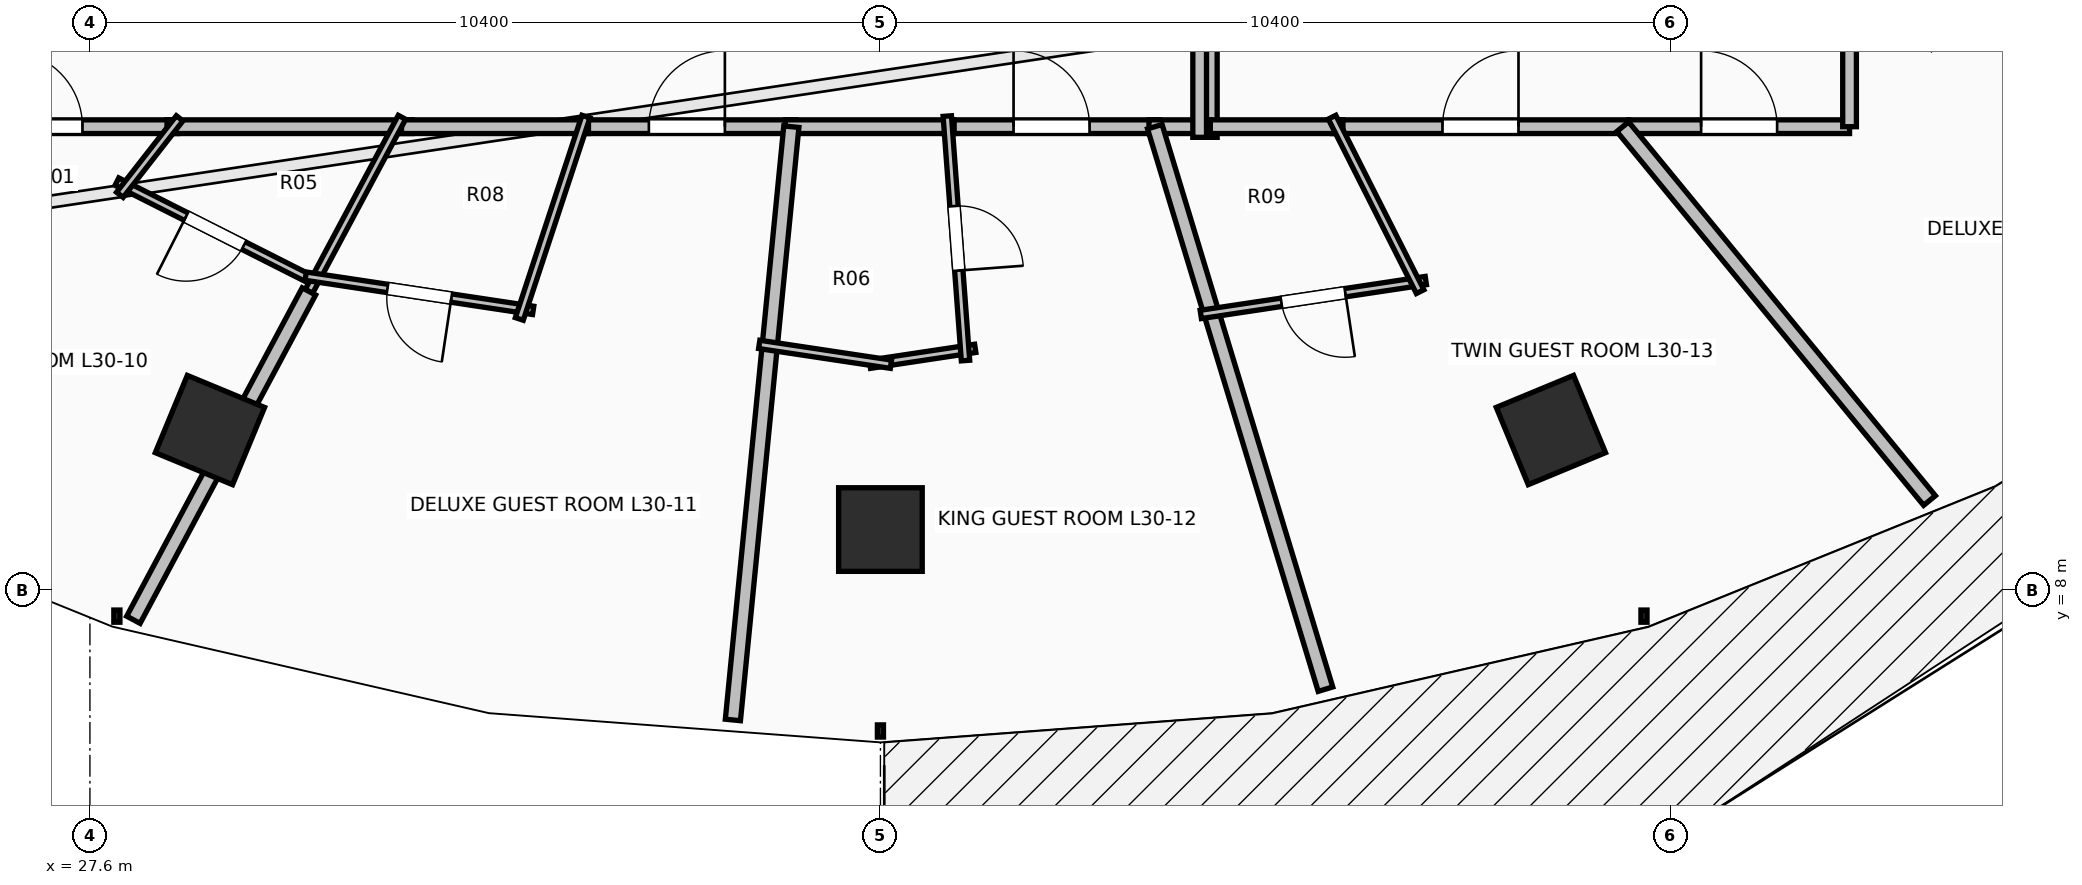
"""IFC4 building model, lengths in metres.
Left out: names, types, materials, properties, quantities, classifications, styles, units other than length and angle.
Written with IfcOpenShell. Run it as: python <this file> out.ifc"""

import sys

from ifc_helpers import new_model, si_unit, direction, frame, frame_2d, origin, origin_2d, place, context, subcontext, project, spatial, rectangle, extrude, element, fill, save


model = new_model("IFC4")
c1 = context("Model", 3, precision=1e-05, world=origin(), true_north=direction((0.0, 1.0)))
c2 = subcontext(c1, "Body", "Model", "MODEL_VIEW")
j1 = project(units=[si_unit("LENGTHUNIT", "METRE"), si_unit("PLANEANGLEUNIT", "RADIAN")], contexts=[c1])
p1 = place(None, origin())
s1 = spatial("IfcSite", under=j1, at=p1, CompositionType="ELEMENT")
p2 = place(p1, origin())
s2 = spatial("IfcBuilding", under=s1, at=p2, CompositionType="ELEMENT")
p3 = place(p2, frame((0.0, 0.0, 113.8)))
s3 = spatial("IfcBuildingStorey", under=s2, at=p3, CompositionType="ELEMENT", Elevation=113.8)
for number, where, z_axis, x_axis in (
    (1, (29.179, 10.109, 0.0), (0.0, 0.0, 1.0), (-0.383, -0.924, 0.0)),
    (2, (38.0, 8.8, 0.0), (0.0, 0.0, 1.0), (0.0, -1.0, 0.0)),
    (3, (46.821, 10.109, 0.0), (0.0, 0.0, 1.0), (0.383, -0.924, 0.0)),
):
    element("IfcColumn", number, at=place(p3, frame(where, z_axis=z_axis, x_axis=x_axis)), inside=s3, PredefinedType="COLUMN", context=c2, shape_type="SweptSolid", body=[
        extrude(rectangle(XDim=1.1, YDim=1.1, at=origin_2d()), origin(), (0.0, 0.0, 1.0), 3.5),
    ])
p4 = place(p3, frame((25.25, 14.1, 0.0), z_axis=(0.0, 0.0, 1.0), x_axis=(1.0, 0.0, 0.0)))
e4 = element("IfcWall", 4, at=p4, inside=s3, PredefinedType="PARTITIONING", context=c2, shape_type="SweptSolid", body=[
    extrude(rectangle(XDim=3.504, YDim=0.18, at=frame_2d((1.752, 0.0))), origin(), (0.0, 0.0, 1.0), 2.432),
])
p5 = place(p4, frame((1.252, 0.0, 0.0)))
e5 = element("IfcOpeningElement", 5, at=p5, cuts=e4, PredefinedType="OPENING", context=c2, shape_type="SweptSolid", body=[
    extrude(rectangle(XDim=1.0, YDim=2.15, at=frame_2d((0.5, 1.075))), frame((0.0, 0.105, 0.0), z_axis=(0.0, -1.0, 0.0), x_axis=(1.0, 0.0, 0.0)), (0.0, 0.0, 1.0), 0.21),
])
p6 = place(p3, frame((28.614, 14.1, 0.0), z_axis=(0.0, 0.0, 1.0), x_axis=(1.0, 0.0, 0.0)))
e6 = element("IfcWall", 6, at=p6, inside=s3, PredefinedType="PARTITIONING", context=c2, shape_type="SweptSolid", body=[
    extrude(rectangle(XDim=3.225, YDim=0.18, at=frame_2d((1.613, 0.0))), origin(), (0.0, 0.0, 1.0), 2.929),
])
p7 = place(p3, frame((34.019, 14.1, 0.0), z_axis=(0.0, 0.0, 1.0), x_axis=(1.0, 0.0, 0.0)))
e7 = element("IfcWall", 7, at=p7, inside=s3, PredefinedType="PARTITIONING", context=c2, shape_type="SweptSolid", body=[
    extrude(rectangle(XDim=2.869, YDim=0.18, at=frame_2d((1.435, 0.0))), origin(), (0.0, 0.0, 1.0), 2.929),
])
p8 = place(p7, frame((0.935, 0.0, 0.0)))
e8 = element("IfcOpeningElement", 8, at=p8, cuts=e7, PredefinedType="OPENING", context=c2, shape_type="SweptSolid", body=[
    extrude(rectangle(XDim=1.0, YDim=2.15, at=frame_2d((0.5, 1.075))), frame((0.0, 0.105, 0.0), z_axis=(0.0, -1.0, 0.0), x_axis=(1.0, 0.0, 0.0)), (0.0, 0.0, 1.0), 0.21),
])
p9 = place(p3, frame((31.699, 14.1, 0.0), z_axis=(0.0, 0.0, 1.0), x_axis=(1.0, 0.0, 0.0)))
e9 = element("IfcWall", 9, at=p9, inside=s3, PredefinedType="PARTITIONING", context=c2, shape_type="SweptSolid", body=[
    extrude(rectangle(XDim=2.46, YDim=0.18, at=frame_2d((1.23, 0.0))), origin(), (0.0, 0.0, 1.0), 2.929),
])
p10 = place(p3, frame((38.83, 14.1, 0.0), z_axis=(0.0, 0.0, 1.0), x_axis=(1.0, 0.0, 0.0)))
e10 = element("IfcWall", 10, at=p10, inside=s3, PredefinedType="PARTITIONING", context=c2, shape_type="SweptSolid", body=[
    extrude(rectangle(XDim=2.843, YDim=0.18, at=frame_2d((1.421, 0.0))), origin(), (0.0, 0.0, 1.0), 2.929),
])
p11 = place(p10, frame((0.921, 0.0, 0.0)))
e11 = element("IfcOpeningElement", 11, at=p11, cuts=e10, PredefinedType="OPENING", context=c2, shape_type="SweptSolid", body=[
    extrude(rectangle(XDim=1.0, YDim=2.15, at=frame_2d((0.5, 1.075))), frame((0.0, 0.105, 0.0), z_axis=(0.0, -1.0, 0.0), x_axis=(1.0, 0.0, 0.0)), (0.0, 0.0, 1.0), 0.21),
])
p12 = place(p3, frame((36.748, 14.1, 0.0), z_axis=(0.0, 0.0, 1.0), x_axis=(1.0, 0.0, 0.0)))
e12 = element("IfcWall", 12, at=p12, inside=s3, PredefinedType="PARTITIONING", context=c2, shape_type="SweptSolid", body=[
    extrude(rectangle(XDim=2.222, YDim=0.18, at=frame_2d((1.111, 0.0))), origin(), (0.0, 0.0, 1.0), 2.929),
])
p13 = place(p3, frame((43.945, 14.1, 0.0), z_axis=(0.0, 0.0, 1.0), x_axis=(1.0, 0.0, 0.0)))
e13 = element("IfcWall", 13, at=p13, inside=s3, PredefinedType="PARTITIONING", context=c2, shape_type="SweptSolid", body=[
    extrude(rectangle(XDim=3.899, YDim=0.18, at=frame_2d((1.949, 0.0))), origin(), (0.0, 0.0, 1.0), 2.432),
])
p14 = place(p13, frame((1.449, 0.0, 0.0)))
e14 = element("IfcOpeningElement", 14, at=p14, cuts=e13, PredefinedType="OPENING", context=c2, shape_type="SweptSolid", body=[
    extrude(rectangle(XDim=1.0, YDim=2.15, at=frame_2d((0.5, 1.075))), frame((0.0, 0.105, 0.0), z_axis=(0.0, -1.0, 0.0), x_axis=(1.0, 0.0, 0.0)), (0.0, 0.0, 1.0), 0.21),
])
p15 = place(p3, frame((42.34, 16.38, 0.0), z_axis=(0.0, 0.0, 1.0), x_axis=(0.0, -1.0, 0.0)))
e15 = element("IfcWall", 15, at=p15, inside=s3, PredefinedType="PARTITIONING", context=c2, shape_type="SweptSolid", body=[
    extrude(rectangle(XDim=2.42, YDim=0.18, at=frame_2d((1.21, 0.0))), origin(), (0.0, 0.0, 1.0), 2.929),
])
p16 = place(p3, frame((42.2, 14.1, 0.0), z_axis=(0.0, 0.0, 1.0), x_axis=(1.0, 0.0, 0.0)))
e16 = element("IfcWall", 16, at=p16, inside=s3, PredefinedType="PARTITIONING", context=c2, shape_type="SweptSolid", body=[
    extrude(rectangle(XDim=1.885, YDim=0.18, at=frame_2d((0.942, 0.0))), origin(), (0.0, 0.0, 1.0), 2.929),
])
p17 = place(p3, frame((41.533, 14.1, 0.0), z_axis=(0.0, 0.0, 1.0), x_axis=(1.0, 0.0, 0.0)))
e17 = element("IfcWall", 17, at=p17, inside=s3, PredefinedType="PARTITIONING", context=c2, shape_type="SweptSolid", body=[
    extrude(rectangle(XDim=0.807, YDim=0.18, at=frame_2d((0.404, 0.0))), origin(), (0.0, 0.0, 1.0), 2.929),
])
p18 = place(p3, frame((42.2, 13.96, 0.0), z_axis=(0.0, 0.0, 1.0), x_axis=(0.0, 1.0, 0.0)))
e18 = element("IfcWall", 18, at=p18, inside=s3, PredefinedType="PARTITIONING", context=c2, shape_type="SweptSolid", body=[
    extrude(rectangle(XDim=2.42, YDim=0.18, at=frame_2d((1.21, 0.0))), origin(), (0.0, 0.0, 1.0), 2.929),
])
p19 = place(p3, frame((47.844, 14.1, 0.0), z_axis=(0.0, 0.0, 1.0), x_axis=(1.0, 0.0, 0.0)))
e19 = element("IfcWall", 19, at=p19, inside=s3, PredefinedType="PARTITIONING", context=c2, shape_type="SweptSolid", body=[
    extrude(rectangle(XDim=2.906, YDim=0.18, at=frame_2d((1.453, 0.0))), origin(), (0.0, 0.0, 1.0), 2.432),
])
p20 = place(p19, frame((0.953, 0.0, 0.0)))
e20 = element("IfcOpeningElement", 20, at=p20, cuts=e19, PredefinedType="OPENING", context=c2, shape_type="SweptSolid", body=[
    extrude(rectangle(XDim=1.0, YDim=2.15, at=frame_2d((0.5, 1.075))), frame((0.0, 0.105, 0.0), z_axis=(0.0, -1.0, 0.0), x_axis=(1.0, 0.0, 0.0)), (0.0, 0.0, 1.0), 0.21),
])
p21 = place(p3, frame((50.75, 14.1, 0.0), z_axis=(0.0, 0.0, 1.0), x_axis=(0.0, 1.0, 0.0)))
e21 = element("IfcWall", 21, at=p21, inside=s3, PredefinedType="PARTITIONING", context=c2, shape_type="SweptSolid", body=[
    extrude(rectangle(XDim=1.99, YDim=0.18, at=frame_2d((0.995, 0.0))), origin(), (0.0, 0.0, 1.0), 2.432),
])
p22 = place(p3, frame((30.533, 12.075, 0.0), z_axis=(0.0, 0.0, 1.0), x_axis=(-0.89257679281, 0.450895407979, 0.0)))
e22 = element("IfcWall", 22, at=p22, inside=s3, PredefinedType="PARTITIONING", context=c2, shape_type="SweptSolid", body=[
    extrude(rectangle(XDim=2.888, YDim=0.11, at=frame_2d((1.444, 0.0))), origin(), (0.0, 0.0, 1.0), 2.432),
])
p23 = place(p22, frame((1.019, 0.0, 0.0)))
e23 = element("IfcOpeningElement", 23, at=p23, cuts=e22, PredefinedType="OPENING", context=c2, shape_type="SweptSolid", body=[
    extrude(rectangle(XDim=0.85, YDim=2.1, at=frame_2d((0.425, 1.05))), frame((0.0, 0.07, 0.0), z_axis=(0.0, -1.0, 0.0), x_axis=(1.0, 0.0, 0.0)), (0.0, 0.0, 1.0), 0.14),
])
p24 = place(p3, frame((27.994, 13.204, 0.0), z_axis=(0.0, 0.0, 1.0), x_axis=(0.615632914819, 0.788033066687, 0.0)))
e24 = element("IfcWall", 24, at=p24, inside=s3, PredefinedType="PARTITIONING", context=c2, shape_type="SweptSolid", body=[
    extrude(rectangle(XDim=1.277, YDim=0.11, at=frame_2d((0.639, 0.0))), origin(), (0.0, 0.0, 1.0), 2.432),
])
p25 = place(p3, frame((30.481, 11.934, 0.0), z_axis=(0.0, 0.0, 1.0), x_axis=(0.471456709401, 0.881889205718, 0.0)))
e25 = element("IfcWall", 25, at=p25, inside=s3, PredefinedType="PARTITIONING", context=c2, shape_type="SweptSolid", body=[
    extrude(rectangle(XDim=2.596, YDim=0.11, at=frame_2d((1.298, 0.0))), origin(), (0.0, 0.0, 1.0), 2.886),
])
p26 = place(p3, frame((28.172, 7.613, 0.0), z_axis=(0.0, 0.0, 1.0), x_axis=(0.47136925097, 0.881935955294, 0.0)))
e26 = element("IfcWall", 26, at=p26, inside=s3, PredefinedType="PARTITIONING", context=c2, shape_type="SweptSolid", body=[
    extrude(rectangle(XDim=4.899, YDim=0.2, at=frame_2d((2.449, 0.0))), origin(), (0.0, 0.0, 1.0), 2.677),
])
p27 = place(p3, frame((33.431, 11.683, 0.0), z_axis=(0.0, 0.0, 1.0), x_axis=(-0.988849795555, 0.148916358508, 0.0)))
e27 = element("IfcWall", 27, at=p27, inside=s3, PredefinedType="PARTITIONING", context=c2, shape_type="SweptSolid", body=[
    extrude(rectangle(XDim=3.026, YDim=0.11, at=frame_2d((1.513, 0.0))), origin(), (0.0, 0.0, 1.0), 2.886),
])
p28 = place(p27, frame((1.088, 0.0, 0.0)))
e28 = element("IfcOpeningElement", 28, at=p28, cuts=e27, PredefinedType="OPENING", context=c2, shape_type="SweptSolid", body=[
    extrude(rectangle(XDim=0.85, YDim=2.1, at=frame_2d((0.425, 1.05))), frame((0.0, 0.07, 0.0), z_axis=(0.0, -1.0, 0.0), x_axis=(1.0, 0.0, 0.0)), (0.0, 0.0, 1.0), 0.14),
])
p29 = place(p3, frame((34.126, 14.233, 0.0), z_axis=(0.0, 0.0, 1.0), x_axis=(-0.312749678962, -0.949835584882, 0.0)))
e29 = element("IfcWall", 29, at=p29, inside=s3, PredefinedType="PARTITIONING", context=c2, shape_type="SweptSolid", body=[
    extrude(rectangle(XDim=2.802, YDim=0.11, at=frame_2d((1.401, 0.0))), origin(), (0.0, 0.0, 1.0), 2.886),
])
p30 = place(p3, frame((36.059, 6.295, 0.0), z_axis=(0.0, 0.0, 1.0), x_axis=(0.098024226043, 0.995184028765, 0.0)))
e30 = element("IfcWall", 30, at=p30, inside=s3, PredefinedType="PARTITIONING", context=c2, shape_type="SweptSolid", body=[
    extrude(rectangle(XDim=7.843, YDim=0.2, at=frame_2d((3.921, 0.0))), origin(), (0.0, 0.0, 1.0), 2.677),
])
p31 = place(p3, frame((39.247, 11.184, 0.0), z_axis=(0.0, 0.0, 1.0), x_axis=(-0.988844156702, -0.148953797389, 0.0)))
e31 = element("IfcWall", 31, at=p31, inside=s3, PredefinedType="PARTITIONING", context=c2, shape_type="SweptSolid", body=[
    extrude(rectangle(XDim=1.401, YDim=0.11, at=frame_2d((0.701, 0.0))), origin(), (0.0, 0.0, 1.0), 3.24),
])
p32 = place(p3, frame((38.138, 10.975, 0.0), z_axis=(0.0, 0.0, 1.0), x_axis=(-0.988868806461, 0.148790065554, 0.0)))
e32 = element("IfcWall", 32, at=p32, inside=s3, PredefinedType="PARTITIONING", context=c2, shape_type="SweptSolid", body=[
    extrude(rectangle(XDim=1.752, YDim=0.11, at=frame_2d((0.876, 0.0))), origin(), (0.0, 0.0, 1.0), 3.24),
])
p33 = place(p3, frame((38.88, 14.24, 0.0), z_axis=(0.0, 0.0, 1.0), x_axis=(0.074340146514, -0.997232943006, 0.0)))
e33 = element("IfcWall", 33, at=p33, inside=s3, PredefinedType="PARTITIONING", context=c2, shape_type="SweptSolid", body=[
    extrude(rectangle(XDim=3.225, YDim=0.11, at=frame_2d((1.613, 0.0))), origin(), (0.0, 0.0, 1.0), 2.886),
])
p34 = place(p33, frame((1.188, 0.0, 0.0)))
e34 = element("IfcOpeningElement", 34, at=p34, cuts=e33, PredefinedType="OPENING", context=c2, shape_type="SweptSolid", body=[
    extrude(rectangle(XDim=0.85, YDim=2.1, at=frame_2d((0.425, 1.05))), frame((0.0, 0.07, 0.0), z_axis=(0.0, -1.0, 0.0), x_axis=(1.0, 0.0, 0.0)), (0.0, 0.0, 1.0), 0.14),
])
p35 = place(p3, frame((43.855, 6.7, 0.0), z_axis=(0.0, 0.0, 1.0), x_axis=(-0.290292155577, 0.956938067176, 0.0)))
e35 = element("IfcWall", 35, at=p35, inside=s3, PredefinedType="PARTITIONING", context=c2, shape_type="SweptSolid", body=[
    extrude(rectangle(XDim=7.733, YDim=0.2, at=frame_2d((3.867, 0.0))), origin(), (0.0, 0.0, 1.0), 2.432),
])
p36 = place(p3, frame((45.175, 12.076, 0.0), z_axis=(0.0, 0.0, 1.0), x_axis=(-0.988865063855, -0.148814937044, 0.0)))
e36 = element("IfcWall", 36, at=p36, inside=s3, PredefinedType="PARTITIONING", context=c2, shape_type="SweptSolid", body=[
    extrude(rectangle(XDim=2.994, YDim=0.11, at=frame_2d((1.497, 0.0))), origin(), (0.0, 0.0, 1.0), 2.432),
])
p37 = place(p36, frame((1.072, 0.0, 0.0)))
e37 = element("IfcOpeningElement", 37, at=p37, cuts=e36, PredefinedType="OPENING", context=c2, shape_type="SweptSolid", body=[
    extrude(rectangle(XDim=0.85, YDim=2.1, at=frame_2d((0.425, 1.05))), frame((0.0, 0.07, 0.0), z_axis=(0.0, -1.0, 0.0), x_axis=(1.0, 0.0, 0.0)), (0.0, 0.0, 1.0), 0.14),
])
p38 = place(p3, frame((43.942, 14.225, 0.0), z_axis=(0.0, 0.0, 1.0), x_axis=(0.450515334881, -0.892768689548, 0.0)))
e38 = element("IfcWall", 38, at=p38, inside=s3, PredefinedType="PARTITIONING", context=c2, shape_type="SweptSolid", body=[
    extrude(rectangle(XDim=2.571, YDim=0.11, at=frame_2d((1.285, 0.0))), origin(), (0.0, 0.0, 1.0), 2.432),
])
p39 = place(p3, frame((51.802, 9.182, 0.0), z_axis=(0.0, 0.0, 1.0), x_axis=(-0.634357186002, 0.773040076948, 0.0)))
e39 = element("IfcWall", 39, at=p39, inside=s3, PredefinedType="PARTITIONING", context=c2, shape_type="SweptSolid", body=[
    extrude(rectangle(XDim=6.362, YDim=0.2, at=frame_2d((3.181, 0.0))), origin(), (0.0, 0.0, 1.0), 2.432),
])
p40 = place(p5, origin())
e40 = element("IfcDoor", 40, at=p40, inside=s3, OperationType="SINGLE_SWING_LEFT", PredefinedType="DOOR", context=c2, shape_type="SweptSolid", body=[
    extrude(rectangle(XDim=1.0, YDim=2.15, at=frame_2d((0.5, 1.075))), frame((0.0, 0.025, 0.0), z_axis=(0.0, -1.0, 0.0), x_axis=(1.0, 0.0, 0.0)), (0.0, 0.0, 1.0), 0.05),
])
fill(e5, e40)
p41 = place(p8, origin())
e41 = element("IfcDoor", 41, at=p41, inside=s3, OperationType="SINGLE_SWING_RIGHT", PredefinedType="DOOR", context=c2, shape_type="SweptSolid", body=[
    extrude(rectangle(XDim=1.0, YDim=2.15, at=frame_2d((0.5, 1.075))), frame((0.0, 0.025, 0.0), z_axis=(0.0, -1.0, 0.0), x_axis=(1.0, 0.0, 0.0)), (0.0, 0.0, 1.0), 0.05),
])
fill(e8, e41)
p42 = place(p11, origin())
e42 = element("IfcDoor", 42, at=p42, inside=s3, OperationType="SINGLE_SWING_LEFT", PredefinedType="DOOR", context=c2, shape_type="SweptSolid", body=[
    extrude(rectangle(XDim=1.0, YDim=2.15, at=frame_2d((0.5, 1.075))), frame((0.0, 0.025, 0.0), z_axis=(0.0, -1.0, 0.0), x_axis=(1.0, 0.0, 0.0)), (0.0, 0.0, 1.0), 0.05),
])
fill(e11, e42)
p43 = place(p14, origin())
e43 = element("IfcDoor", 43, at=p43, inside=s3, OperationType="SINGLE_SWING_RIGHT", PredefinedType="DOOR", context=c2, shape_type="SweptSolid", body=[
    extrude(rectangle(XDim=1.0, YDim=2.15, at=frame_2d((0.5, 1.075))), frame((0.0, 0.025, 0.0), z_axis=(0.0, -1.0, 0.0), x_axis=(1.0, 0.0, 0.0)), (0.0, 0.0, 1.0), 0.05),
])
fill(e14, e43)
p44 = place(p20, origin())
e44 = element("IfcDoor", 44, at=p44, inside=s3, OperationType="SINGLE_SWING_LEFT", PredefinedType="DOOR", context=c2, shape_type="SweptSolid", body=[
    extrude(rectangle(XDim=1.0, YDim=2.15, at=frame_2d((0.5, 1.075))), frame((0.0, 0.025, 0.0), z_axis=(0.0, -1.0, 0.0), x_axis=(1.0, 0.0, 0.0)), (0.0, 0.0, 1.0), 0.05),
])
fill(e20, e44)
p45 = place(p23, origin())
e45 = element("IfcDoor", 45, at=p45, inside=s3, OperationType="SINGLE_SWING_RIGHT", PredefinedType="DOOR", context=c2, shape_type="SweptSolid", body=[
    extrude(rectangle(XDim=0.85, YDim=2.1, at=frame_2d((0.425, 1.05))), frame((0.0, 0.025, 0.0), z_axis=(0.0, -1.0, 0.0), x_axis=(1.0, 0.0, 0.0)), (0.0, 0.0, 1.0), 0.05),
])
fill(e23, e45)
p46 = place(p28, origin())
e46 = element("IfcDoor", 46, at=p46, inside=s3, OperationType="SINGLE_SWING_LEFT", PredefinedType="DOOR", context=c2, shape_type="SweptSolid", body=[
    extrude(rectangle(XDim=0.85, YDim=2.1, at=frame_2d((0.425, 1.05))), frame((0.0, 0.025, 0.0), z_axis=(0.0, -1.0, 0.0), x_axis=(1.0, 0.0, 0.0)), (0.0, 0.0, 1.0), 0.05),
])
fill(e28, e46)
p47 = place(p34, origin())
e47 = element("IfcDoor", 47, at=p47, inside=s3, OperationType="SINGLE_SWING_RIGHT", PredefinedType="DOOR", context=c2, shape_type="SweptSolid", body=[
    extrude(rectangle(XDim=0.85, YDim=2.1, at=frame_2d((0.425, 1.05))), frame((0.0, 0.025, 0.0), z_axis=(0.0, -1.0, 0.0), x_axis=(1.0, 0.0, 0.0)), (0.0, 0.0, 1.0), 0.05),
])
fill(e34, e47)
p48 = place(p37, origin())
e48 = element("IfcDoor", 48, at=p48, inside=s3, OperationType="SINGLE_SWING_LEFT", PredefinedType="DOOR", context=c2, shape_type="SweptSolid", body=[
    extrude(rectangle(XDim=0.85, YDim=2.1, at=frame_2d((0.425, 1.05))), frame((0.0, 0.025, 0.0), z_axis=(0.0, -1.0, 0.0), x_axis=(1.0, 0.0, 0.0)), (0.0, 0.0, 1.0), 0.05),
])
fill(e37, e48)
save(model, sys.argv[1])
